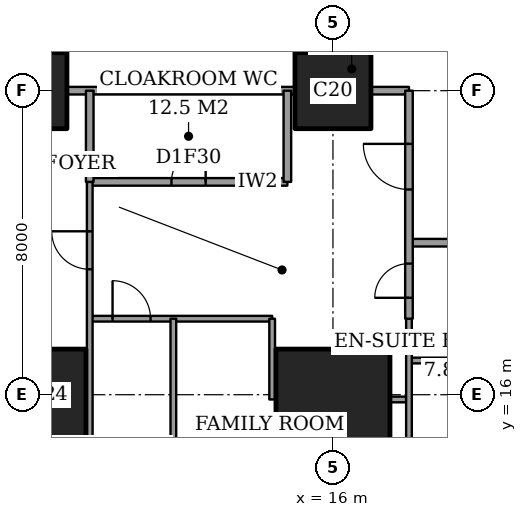
"""IFC4 building model, lengths in metres.
Left out: names, types, materials, properties, quantities, classifications, styles, units other than length and angle.
Written with IfcOpenShell. Run it as: python <this file> out.ifc"""

import sys

from ifc_helpers import new_model, si_unit, direction, frame, frame_2d, origin, origin_2d, place, context, subcontext, project, spatial, rectangle, extrude, element, fill, save


model = new_model("IFC4")
c1 = context("Model", 3, precision=1e-05, world=origin(), true_north=direction((0.0, 1.0)))
c2 = subcontext(c1, "Body", "Model", "MODEL_VIEW")
j1 = project(units=[si_unit("LENGTHUNIT", "METRE"), si_unit("PLANEANGLEUNIT", "RADIAN")], contexts=[c1])
p1 = place(None, origin())
s1 = spatial("IfcSite", under=j1, at=p1, CompositionType="ELEMENT")
p2 = place(p1, origin())
s2 = spatial("IfcBuilding", under=s1, at=p2, CompositionType="ELEMENT")
p3 = place(p2, frame((0.0, 0.0, 164.6)))
s3 = spatial("IfcBuildingStorey", under=s2, at=p3, CompositionType="ELEMENT", Elevation=164.6)
p4 = place(p3, frame((8.0, 16.0, 0.0), z_axis=(0.0, 0.0, 1.0), x_axis=(1.0, 0.0, 0.0)))
e1 = element("IfcColumn", 1, at=p4, inside=s3, PredefinedType="COLUMN", context=c2, shape_type="SweptSolid", body=[
    extrude(rectangle(XDim=3.0, YDim=2.4, at=origin_2d()), origin(), (0.0, 0.0, 1.0), 3.6),
])
p5 = place(p3, frame((8.0, 24.0, 0.0), z_axis=(0.0, 0.0, 1.0), x_axis=(1.0, 0.0, 0.0)))
e2 = element("IfcColumn", 2, at=p5, inside=s3, PredefinedType="COLUMN", context=c2, shape_type="SweptSolid", body=[
    extrude(rectangle(XDim=2.0, YDim=2.0, at=origin_2d()), origin(), (0.0, 0.0, 1.0), 3.6),
])
p6 = place(p3, frame((16.0, 16.0, 0.0), z_axis=(0.0, 0.0, 1.0), x_axis=(1.0, 0.0, 0.0)))
e3 = element("IfcColumn", 3, at=p6, inside=s3, PredefinedType="COLUMN", context=c2, shape_type="SweptSolid", body=[
    extrude(rectangle(XDim=3.0, YDim=2.4, at=origin_2d()), origin(), (0.0, 0.0, 1.0), 3.6),
])
p7 = place(p3, frame((16.0, 24.0, 0.0), z_axis=(0.0, 0.0, 1.0), x_axis=(1.0, 0.0, 0.0)))
e4 = element("IfcColumn", 4, at=p7, inside=s3, PredefinedType="COLUMN", context=c2, shape_type="SweptSolid", body=[
    extrude(rectangle(XDim=2.0, YDim=2.0, at=origin_2d()), origin(), (0.0, 0.0, 1.0), 3.6),
])
p8 = place(p3, frame((17.5, 15.875, 0.0), z_axis=(0.0, 0.0, 1.0), x_axis=(1.0, 0.0, 0.0)))
e5 = element("IfcWall", 5, at=p8, inside=s3, PredefinedType="PARTITIONING", context=c2, shape_type="SweptSolid", body=[
    extrude(rectangle(XDim=0.5, YDim=0.15, at=frame_2d((0.25, 0.0))), origin(), (0.0, 0.0, 1.0), 2.634),
])
p9 = place(p3, frame((18.0, 16.9, 0.0), z_axis=(0.0, 0.0, 1.0), x_axis=(1.0, 0.0, 0.0)))
e6 = element("IfcWall", 6, at=p9, inside=s3, PredefinedType="PARTITIONING", context=c2, shape_type="SweptSolid", body=[
    extrude(rectangle(XDim=6.0, YDim=0.15, at=frame_2d((3.0, 0.0))), origin(), (0.0, 0.0, 1.0), 3.35),
])
p10 = place(p3, frame((9.6, 18.0, 0.0), z_axis=(0.0, 0.0, 1.0), x_axis=(1.0, 0.0, 0.0)))
e7 = element("IfcWall", 7, at=p10, inside=s3, PredefinedType="PARTITIONING", context=c2, shape_type="SweptSolid", body=[
    extrude(rectangle(XDim=4.8, YDim=0.15, at=frame_2d((2.4, 0.0))), origin(), (0.0, 0.0, 1.0), 3.35),
])
p11 = place(p10, frame((0.6, 0.0, 0.0)))
e8 = element("IfcOpeningElement", 8, at=p11, cuts=e7, PredefinedType="OPENING", context=c2, shape_type="SweptSolid", body=[
    extrude(rectangle(XDim=1.0, YDim=2.1, at=frame_2d((0.5, 1.05))), frame((0.0, 0.085, 0.0), z_axis=(0.0, -1.0, 0.0), x_axis=(1.0, 0.0, 0.0)), (0.0, 0.0, 1.0), 0.17),
])
p12 = place(p3, frame((18.0, 20.0, 0.0), z_axis=(0.0, 0.0, 1.0), x_axis=(1.0, 0.0, 0.0)))
e9 = element("IfcWall", 9, at=p12, inside=s3, PredefinedType="PARTITIONING", context=c2, shape_type="SweptSolid", body=[
    extrude(rectangle(XDim=6.0, YDim=0.2, at=frame_2d((3.0, 0.0))), origin(), (0.0, 0.0, 1.0), 3.35),
])
p13 = place(p3, frame((9.6, 21.6, 0.0), z_axis=(0.0, 0.0, 1.0), x_axis=(1.0, 0.0, 0.0)))
e10 = element("IfcWall", 10, at=p13, inside=s3, PredefinedType="PARTITIONING", context=c2, shape_type="SweptSolid", body=[
    extrude(rectangle(XDim=5.2, YDim=0.2, at=frame_2d((2.6, 0.0))), origin(), (0.0, 0.0, 1.0), 3.35),
])
p14 = place(p13, frame((2.15, 0.0, 0.0)))
e11 = element("IfcOpeningElement", 11, at=p14, cuts=e10, PredefinedType="OPENING", context=c2, shape_type="SweptSolid", body=[
    extrude(rectangle(XDim=0.9, YDim=2.1, at=frame_2d((0.45, 1.05))), frame((0.0, 0.11, 0.0), z_axis=(0.0, -1.0, 0.0), x_axis=(1.0, 0.0, 0.0)), (0.0, 0.0, 1.0), 0.22),
])
p15 = place(p3, frame((9.0, 24.0, 0.0), z_axis=(0.0, 0.0, 1.0), x_axis=(1.0, 0.0, 0.0)))
e12 = element("IfcWall", 12, at=p15, inside=s3, PredefinedType="PARTITIONING", context=c2, shape_type="SweptSolid", body=[
    extrude(rectangle(XDim=6.0, YDim=0.2, at=frame_2d((3.0, 0.0))), origin(), (0.0, 0.0, 1.0), 3.35),
])
p16 = place(p3, frame((17.0, 24.0, 0.0), z_axis=(0.0, 0.0, 1.0), x_axis=(1.0, 0.0, 0.0)))
e13 = element("IfcWall", 13, at=p16, inside=s3, PredefinedType="PARTITIONING", context=c2, shape_type="SweptSolid", body=[
    extrude(rectangle(XDim=1.0, YDim=0.2, at=frame_2d((0.5, 0.0))), origin(), (0.0, 0.0, 1.0), 3.35),
])
p17 = place(p3, frame((9.6, 21.6, 0.0), z_axis=(0.0, 0.0, 1.0), x_axis=(0.0, 1.0, 0.0)))
e14 = element("IfcWall", 14, at=p17, inside=s3, PredefinedType="PARTITIONING", context=c2, shape_type="SweptSolid", body=[
    extrude(rectangle(XDim=2.4, YDim=0.2, at=frame_2d((1.2, 0.0))), origin(), (0.0, 0.0, 1.0), 3.35),
])
p18 = place(p3, frame((9.6, 10.6, 0.0), z_axis=(0.0, 0.0, 1.0), x_axis=(0.0, 1.0, 0.0)))
e15 = element("IfcWall", 15, at=p18, inside=s3, PredefinedType="PARTITIONING", context=c2, shape_type="SweptSolid", body=[
    extrude(rectangle(XDim=11.0, YDim=0.15, at=frame_2d((5.5, 0.0))), origin(), (0.0, 0.0, 1.0), 3.35),
])
p19 = place(p18, frame((8.7, 0.0, 0.0)))
e16 = element("IfcOpeningElement", 16, at=p19, cuts=e15, PredefinedType="OPENING", context=c2, shape_type="SweptSolid", body=[
    extrude(rectangle(XDim=1.0, YDim=2.1, at=frame_2d((0.5, 1.05))), frame((0.0, 0.085, 0.0), z_axis=(0.0, -1.0, 0.0), x_axis=(1.0, 0.0, 0.0)), (0.0, 0.0, 1.0), 0.17),
])
p20 = place(p3, frame((11.8, 10.6, 0.0), z_axis=(0.0, 0.0, 1.0), x_axis=(0.0, 1.0, 0.0)))
e17 = element("IfcWall", 17, at=p20, inside=s3, PredefinedType="PARTITIONING", context=c2, shape_type="SweptSolid", body=[
    extrude(rectangle(XDim=7.4, YDim=0.15, at=frame_2d((3.7, 0.0))), origin(), (0.0, 0.0, 1.0), 3.35),
])
p21 = place(p3, frame((14.4, 15.875, 0.0), z_axis=(0.0, 0.0, 1.0), x_axis=(0.0, 1.0, 0.0)))
e18 = element("IfcWall", 18, at=p21, inside=s3, PredefinedType="PARTITIONING", context=c2, shape_type="SweptSolid", body=[
    extrude(rectangle(XDim=2.125, YDim=0.15, at=frame_2d((1.062, 0.0))), origin(), (0.0, 0.0, 1.0), 3.35),
])
p22 = place(p3, frame((14.8, 21.6, 0.0), z_axis=(0.0, 0.0, 1.0), x_axis=(0.0, 1.0, 0.0)))
e19 = element("IfcWall", 19, at=p22, inside=s3, PredefinedType="PARTITIONING", context=c2, shape_type="SweptSolid", body=[
    extrude(rectangle(XDim=2.4, YDim=0.2, at=frame_2d((1.2, 0.0))), origin(), (0.0, 0.0, 1.0), 3.35),
])
p23 = place(p3, frame((18.0, 18.0, 0.0), z_axis=(0.0, 0.0, 1.0), x_axis=(0.0, 1.0, 0.0)))
e20 = element("IfcWall", 20, at=p23, inside=s3, PredefinedType="PARTITIONING", context=c2, shape_type="SweptSolid", body=[
    extrude(rectangle(XDim=6.0, YDim=0.2, at=frame_2d((3.0, 0.0))), origin(), (0.0, 0.0, 1.0), 3.35),
])
p24 = place(p23, frame((3.4, 0.0, 0.0)))
e21 = element("IfcOpeningElement", 21, at=p24, cuts=e20, PredefinedType="OPENING", context=c2, shape_type="SweptSolid", body=[
    extrude(rectangle(XDim=1.2, YDim=2.4, at=frame_2d((0.6, 1.2))), frame((0.0, 0.11, 0.0), z_axis=(0.0, -1.0, 0.0), x_axis=(1.0, 0.0, 0.0)), (0.0, 0.0, 1.0), 0.22),
])
p25 = place(p23, frame((0.55, 0.0, 0.0)))
e22 = element("IfcOpeningElement", 22, at=p25, cuts=e20, PredefinedType="OPENING", context=c2, shape_type="SweptSolid", body=[
    extrude(rectangle(XDim=0.9, YDim=2.1, at=frame_2d((0.45, 1.05))), frame((0.0, 0.11, 0.0), z_axis=(0.0, -1.0, 0.0), x_axis=(1.0, 0.0, 0.0)), (0.0, 0.0, 1.0), 0.22),
])
p26 = place(p3, frame((18.0, 10.6, 0.0), z_axis=(0.0, 0.0, 1.0), x_axis=(0.0, 1.0, 0.0)))
e23 = element("IfcWall", 23, at=p26, inside=s3, PredefinedType="PARTITIONING", context=c2, shape_type="SweptSolid", body=[
    extrude(rectangle(XDim=7.4, YDim=0.15, at=frame_2d((3.7, 0.0))), origin(), (0.0, 0.0, 1.0), 3.35),
])
p27 = place(p19, origin())
e24 = element("IfcDoor", 24, at=p27, inside=s3, OperationType="SINGLE_SWING_LEFT", PredefinedType="DOOR", context=c2, shape_type="SweptSolid", body=[
    extrude(rectangle(XDim=1.0, YDim=2.1, at=frame_2d((0.5, 1.05))), frame((0.0, 0.025, 0.0), z_axis=(0.0, -1.0, 0.0), x_axis=(1.0, 0.0, 0.0)), (0.0, 0.0, 1.0), 0.05),
])
fill(e16, e24)
p28 = place(p14, origin())
e25 = element("IfcDoor", 25, at=p28, inside=s3, OperationType="SINGLE_SWING_LEFT", PredefinedType="DOOR", context=c2, shape_type="SweptSolid", body=[
    extrude(rectangle(XDim=0.9, YDim=2.1, at=frame_2d((0.45, 1.05))), frame((0.0, 0.025, 0.0), z_axis=(0.0, -1.0, 0.0), x_axis=(1.0, 0.0, 0.0)), (0.0, 0.0, 1.0), 0.05),
])
fill(e11, e25)
p29 = place(p24, origin())
e26 = element("IfcDoor", 26, at=p29, inside=s3, OperationType="SINGLE_SWING_LEFT", PredefinedType="DOOR", context=c2, shape_type="SweptSolid", body=[
    extrude(rectangle(XDim=1.2, YDim=2.4, at=frame_2d((0.6, 1.2))), frame((0.0, 0.025, 0.0), z_axis=(0.0, -1.0, 0.0), x_axis=(1.0, 0.0, 0.0)), (0.0, 0.0, 1.0), 0.05),
])
fill(e21, e26)
p30 = place(p11, origin())
e27 = element("IfcDoor", 27, at=p30, inside=s3, OperationType="SINGLE_SWING_RIGHT", PredefinedType="DOOR", context=c2, shape_type="SweptSolid", body=[
    extrude(rectangle(XDim=1.0, YDim=2.1, at=frame_2d((0.5, 1.05))), frame((0.0, 0.025, 0.0), z_axis=(0.0, -1.0, 0.0), x_axis=(1.0, 0.0, 0.0)), (0.0, 0.0, 1.0), 0.05),
])
fill(e8, e27)
p31 = place(p25, origin())
e28 = element("IfcDoor", 28, at=p31, inside=s3, OperationType="SINGLE_SWING_RIGHT", PredefinedType="DOOR", context=c2, shape_type="SweptSolid", body=[
    extrude(rectangle(XDim=0.9, YDim=2.1, at=frame_2d((0.45, 1.05))), frame((0.0, 0.025, 0.0), z_axis=(0.0, -1.0, 0.0), x_axis=(1.0, 0.0, 0.0)), (0.0, 0.0, 1.0), 0.05),
])
fill(e22, e28)
save(model, sys.argv[1])
